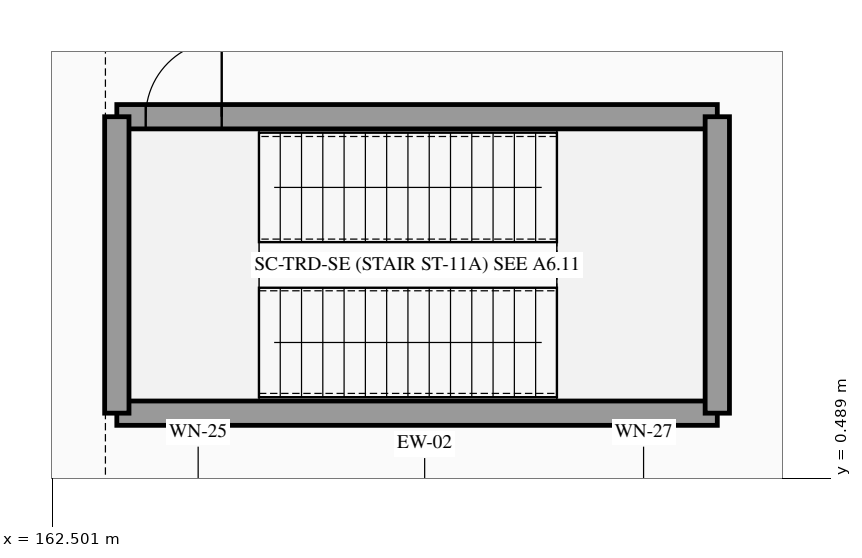
"""IFC4 building model, lengths in metres.
Left out: names, types, materials, properties, quantities, classifications, styles, units other than length and angle.
Written with IfcOpenShell. Run it as: python <this file> out.ifc"""

import sys

from ifc_helpers import new_model, si_unit, direction, frame, frame_2d, origin, place, context, subcontext, project, spatial, rectangle, extrude, element, fill, save


model = new_model("IFC4")
c1 = context("Model", 3, precision=1e-05, world=origin(), true_north=direction((0.0, 1.0)))
c2 = subcontext(c1, "Body", "Model", "MODEL_VIEW")
j1 = project(units=[si_unit("LENGTHUNIT", "METRE"), si_unit("PLANEANGLEUNIT", "RADIAN")], contexts=[c1])
p1 = place(None, origin())
s1 = spatial("IfcSite", under=j1, at=p1, CompositionType="ELEMENT")
p2 = place(p1, origin())
s2 = spatial("IfcBuilding", under=s1, at=p2, CompositionType="ELEMENT")
p3 = place(p2, origin())
s3 = spatial("IfcBuildingStorey", under=s2, at=p3, CompositionType="ELEMENT", Elevation=0.0)
p4 = place(p3, frame((163.35, 1.35, 0.0), z_axis=(0.0, 0.0, 1.0), x_axis=(1.0, 0.0, 0.0)))
e1 = element("IfcWall", 1, at=p4, inside=s3, PredefinedType="SHEAR", context=c2, shape_type="SweptSolid", body=[
    extrude(rectangle(XDim=7.9, YDim=0.32, at=frame_2d((3.95, 0.0))), origin(), (0.0, 0.0, 1.0), 5.4),
])
p5 = place(p3, frame((163.35, 5.25, 0.0), z_axis=(0.0, 0.0, 1.0), x_axis=(1.0, 0.0, 0.0)))
e2 = element("IfcWall", 2, at=p5, inside=s3, PredefinedType="SHEAR", context=c2, shape_type="SweptSolid", body=[
    extrude(rectangle(XDim=7.9, YDim=0.32, at=frame_2d((3.95, 0.0))), origin(), (0.0, 0.0, 1.0), 5.4),
])
p6 = place(p5, frame((0.38, 0.0, 0.0)))
e3 = element("IfcOpeningElement", 3, at=p6, cuts=e2, PredefinedType="OPENING", context=c2, shape_type="SweptSolid", body=[
    extrude(rectangle(XDim=1.0, YDim=2.15, at=frame_2d((0.5, 1.075))), frame((0.0, 0.17, 0.0), z_axis=(0.0, -1.0, 0.0), x_axis=(1.0, 0.0, 0.0)), (0.0, 0.0, 1.0), 0.34),
])
for number, where, z_axis, x_axis in (
    (4, (163.35, 1.35, 0.0), (0.0, 0.0, 1.0), (0.0, 1.0, 0.0)),
    (5, (171.25, 1.35, 0.0), (0.0, 0.0, 1.0), (0.0, 1.0, 0.0)),
):
    element("IfcWall", number, at=place(p3, frame(where, z_axis=z_axis, x_axis=x_axis)), inside=s3, PredefinedType="SHEAR", context=c2, shape_type="SweptSolid", body=[
        extrude(rectangle(XDim=3.9, YDim=0.32, at=frame_2d((1.95, 0.0))), origin(), (0.0, 0.0, 1.0), 5.4),
    ])
p7 = place(p6, frame((1.0, 0.0, 0.0), z_axis=(0.0, 0.0, 1.0), x_axis=(-1.0, 0.0, 0.0)))
e6 = element("IfcDoor", 6, at=p7, inside=s3, OperationType="SINGLE_SWING_RIGHT", PredefinedType="DOOR", context=c2, shape_type="SweptSolid", body=[
    extrude(rectangle(XDim=1.0, YDim=2.15, at=frame_2d((0.5, 1.075))), frame((0.0, 0.025, 0.0), z_axis=(0.0, -1.0, 0.0), x_axis=(1.0, 0.0, 0.0)), (0.0, 0.0, 1.0), 0.05),
])
fill(e3, e6)
save(model, sys.argv[1])
